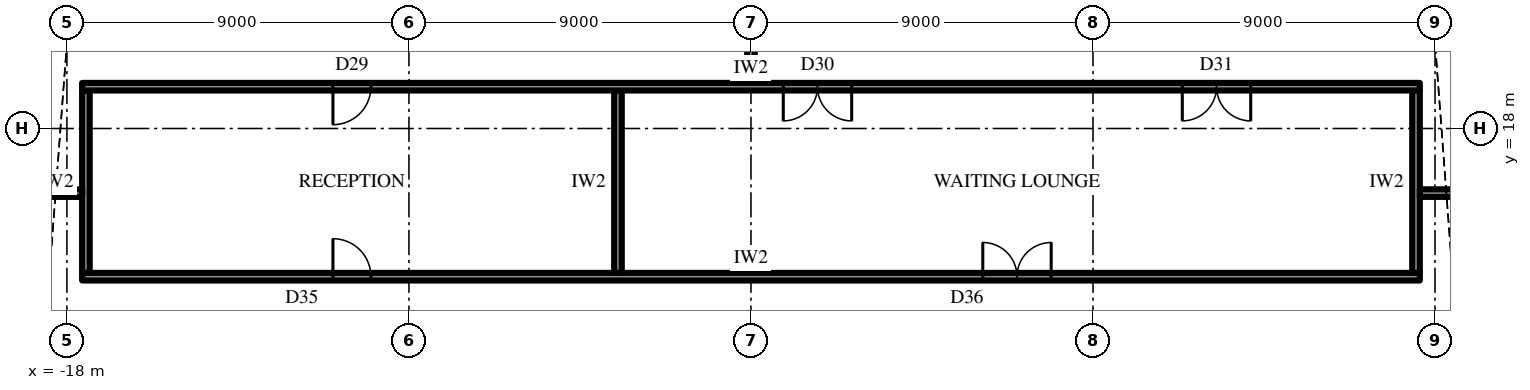
"""IFC4 building model, lengths in metres.
Left out: names, types, materials, properties, quantities, classifications, styles, units other than length and angle.
Written with IfcOpenShell. Run it as: python <this file> out.ifc"""

import sys

from ifc_helpers import new_model, si_unit, direction, frame, frame_2d, origin, place, context, subcontext, project, spatial, rectangle, extrude, element, fill, save


model = new_model("IFC4")
c1 = context("Model", 3, precision=1e-05, world=origin(), true_north=direction((0.0, 1.0)))
c2 = subcontext(c1, "Body", "Model", "MODEL_VIEW")
j1 = project(units=[si_unit("LENGTHUNIT", "METRE"), si_unit("PLANEANGLEUNIT", "RADIAN")], contexts=[c1])
p1 = place(None, origin())
s1 = spatial("IfcSite", under=j1, at=p1, CompositionType="ELEMENT")
p2 = place(p1, origin())
s2 = spatial("IfcBuilding", under=s1, at=p2, CompositionType="ELEMENT")
p3 = place(p2, frame((0.0, 0.0, 114.5)))
s3 = spatial("IfcBuildingStorey", under=s2, at=p3, CompositionType="ELEMENT", Elevation=114.5)
p4 = place(p3, frame((-17.6, 14.1, 0.0), z_axis=(0.0, 0.0, 1.0), x_axis=(1.0, 0.0, 0.0)))
e1 = element("IfcWall", 1, at=p4, inside=s3, PredefinedType="PARTITIONING", context=c2, shape_type="SweptSolid", body=[
    extrude(rectangle(XDim=35.2, YDim=0.2, at=frame_2d((17.6, 0.0))), origin(), (0.0, 0.0, 1.0), 4.8),
])
p5 = place(p4, frame((6.6, 0.0, 0.0)))
e2 = element("IfcOpeningElement", 2, at=p5, cuts=e1, PredefinedType="OPENING", context=c2, shape_type="SweptSolid", body=[
    extrude(rectangle(XDim=1.0, YDim=2.2, at=frame_2d((0.5, 1.1))), frame((0.0, 0.11, 0.0), z_axis=(0.0, -1.0, 0.0), x_axis=(1.0, 0.0, 0.0)), (0.0, 0.0, 1.0), 0.22),
])
p6 = place(p4, frame((23.7, 0.0, 0.0)))
e3 = element("IfcOpeningElement", 3, at=p6, cuts=e1, PredefinedType="OPENING", context=c2, shape_type="SweptSolid", body=[
    extrude(rectangle(XDim=1.8, YDim=2.4, at=frame_2d((0.9, 1.2))), frame((0.0, 0.11, 0.0), z_axis=(0.0, -1.0, 0.0), x_axis=(1.0, 0.0, 0.0)), (0.0, 0.0, 1.0), 0.22),
])
for number, where, z_axis, x_axis in (
    (4, (-17.5, 14.2, 0.0), (0.0, 0.0, 1.0), (0.0, 1.0, 0.0)),
    (5, (-3.5, 14.2, 0.0), (0.0, 0.0, 1.0), (0.0, 1.0, 0.0)),
    (6, (17.5, 14.2, 0.0), (0.0, 0.0, 1.0), (0.0, 1.0, 0.0)),
):
    element("IfcWall", number, at=place(p3, frame(where, z_axis=z_axis, x_axis=x_axis)), inside=s3, PredefinedType="PARTITIONING", context=c2, shape_type="SweptSolid", body=[
        extrude(rectangle(XDim=4.8, YDim=0.2, at=frame_2d((2.4, 0.0))), origin(), (0.0, 0.0, 1.0), 4.8),
    ])
p7 = place(p3, frame((-17.6, 19.1, 0.0), z_axis=(0.0, 0.0, 1.0), x_axis=(1.0, 0.0, 0.0)))
e7 = element("IfcWall", 7, at=p7, inside=s3, PredefinedType="PARTITIONING", context=c2, shape_type="SweptSolid", body=[
    extrude(rectangle(XDim=35.2, YDim=0.2, at=frame_2d((17.6, 0.0))), origin(), (0.0, 0.0, 1.0), 4.8),
])
p8 = place(p7, frame((6.6, 0.0, 0.0)))
e8 = element("IfcOpeningElement", 8, at=p8, cuts=e7, PredefinedType="OPENING", context=c2, shape_type="SweptSolid", body=[
    extrude(rectangle(XDim=1.0, YDim=2.2, at=frame_2d((0.5, 1.1))), frame((0.0, 0.11, 0.0), z_axis=(0.0, -1.0, 0.0), x_axis=(1.0, 0.0, 0.0)), (0.0, 0.0, 1.0), 0.22),
])
p9 = place(p7, frame((18.45, 0.0, 0.0)))
e9 = element("IfcOpeningElement", 9, at=p9, cuts=e7, PredefinedType="OPENING", context=c2, shape_type="SweptSolid", body=[
    extrude(rectangle(XDim=1.8, YDim=2.4, at=frame_2d((0.9, 1.2))), frame((0.0, 0.11, 0.0), z_axis=(0.0, -1.0, 0.0), x_axis=(1.0, 0.0, 0.0)), (0.0, 0.0, 1.0), 0.22),
])
p10 = place(p7, frame((28.95, 0.0, 0.0)))
e10 = element("IfcOpeningElement", 10, at=p10, cuts=e7, PredefinedType="OPENING", context=c2, shape_type="SweptSolid", body=[
    extrude(rectangle(XDim=1.8, YDim=2.4, at=frame_2d((0.9, 1.2))), frame((0.0, 0.11, 0.0), z_axis=(0.0, -1.0, 0.0), x_axis=(1.0, 0.0, 0.0)), (0.0, 0.0, 1.0), 0.22),
])
for number, where, z_axis, x_axis in (
    (11, (17.6, 16.3, 0.0), (0.0, 0.0, 1.0), (1.0, 0.0, 0.0)),
    (12, (-17.6, 16.3, 0.0), (0.0, 0.0, 1.0), (-1.0, 0.0, 0.0)),
):
    element("IfcWall", number, at=place(p3, frame(where, z_axis=z_axis, x_axis=x_axis)), inside=s3, PredefinedType="PARTITIONING", context=c2, shape_type="SweptSolid", body=[
        extrude(rectangle(XDim=4.9, YDim=0.2, at=frame_2d((2.45, 0.0))), origin(), (0.0, 0.0, 1.0), 4.8),
    ])
p11 = place(p3, frame((0.0, 19.2, 0.0), z_axis=(0.0, 0.0, 1.0), x_axis=(0.0, 1.0, 0.0)))
e13 = element("IfcWall", 13, at=p11, inside=s3, PredefinedType="PARTITIONING", context=c2, shape_type="SweptSolid", body=[
    extrude(rectangle(XDim=12.11, YDim=0.2, at=frame_2d((6.055, 0.0))), origin(), (0.0, 0.0, 1.0), 3.792),
])
p12 = place(p8, frame((1.0, 0.0, 0.0), z_axis=(0.0, 0.0, 1.0), x_axis=(-1.0, 0.0, 0.0)))
e14 = element("IfcDoor", 14, at=p12, inside=s3, OperationType="SINGLE_SWING_LEFT", PredefinedType="DOOR", context=c2, shape_type="SweptSolid", body=[
    extrude(rectangle(XDim=1.0, YDim=2.2, at=frame_2d((0.5, 1.1))), frame((0.0, 0.025, 0.0), z_axis=(0.0, -1.0, 0.0), x_axis=(1.0, 0.0, 0.0)), (0.0, 0.0, 1.0), 0.05),
])
fill(e8, e14)
p13 = place(p9, frame((1.8, 0.0, 0.0), z_axis=(0.0, 0.0, 1.0), x_axis=(-1.0, 0.0, 0.0)))
e15 = element("IfcDoor", 15, at=p13, inside=s3, OperationType="DOUBLE_DOOR_SINGLE_SWING", PredefinedType="DOOR", context=c2, shape_type="SweptSolid", body=[
    extrude(rectangle(XDim=1.8, YDim=2.4, at=frame_2d((0.9, 1.2))), frame((0.0, 0.025, 0.0), z_axis=(0.0, -1.0, 0.0), x_axis=(1.0, 0.0, 0.0)), (0.0, 0.0, 1.0), 0.05),
])
fill(e9, e15)
p14 = place(p10, frame((1.8, 0.0, 0.0), z_axis=(0.0, 0.0, 1.0), x_axis=(-1.0, 0.0, 0.0)))
e16 = element("IfcDoor", 16, at=p14, inside=s3, OperationType="DOUBLE_DOOR_SINGLE_SWING", PredefinedType="DOOR", context=c2, shape_type="SweptSolid", body=[
    extrude(rectangle(XDim=1.8, YDim=2.4, at=frame_2d((0.9, 1.2))), frame((0.0, 0.025, 0.0), z_axis=(0.0, -1.0, 0.0), x_axis=(1.0, 0.0, 0.0)), (0.0, 0.0, 1.0), 0.05),
])
fill(e10, e16)
p15 = place(p5, origin())
e17 = element("IfcDoor", 17, at=p15, inside=s3, OperationType="SINGLE_SWING_RIGHT", PredefinedType="DOOR", context=c2, shape_type="SweptSolid", body=[
    extrude(rectangle(XDim=1.0, YDim=2.2, at=frame_2d((0.5, 1.1))), frame((0.0, 0.025, 0.0), z_axis=(0.0, -1.0, 0.0), x_axis=(1.0, 0.0, 0.0)), (0.0, 0.0, 1.0), 0.05),
])
fill(e2, e17)
p16 = place(p6, origin())
e18 = element("IfcDoor", 18, at=p16, inside=s3, OperationType="DOUBLE_DOOR_SINGLE_SWING", PredefinedType="DOOR", context=c2, shape_type="SweptSolid", body=[
    extrude(rectangle(XDim=1.8, YDim=2.4, at=frame_2d((0.9, 1.2))), frame((0.0, 0.025, 0.0), z_axis=(0.0, -1.0, 0.0), x_axis=(1.0, 0.0, 0.0)), (0.0, 0.0, 1.0), 0.05),
])
fill(e3, e18)
save(model, sys.argv[1])
